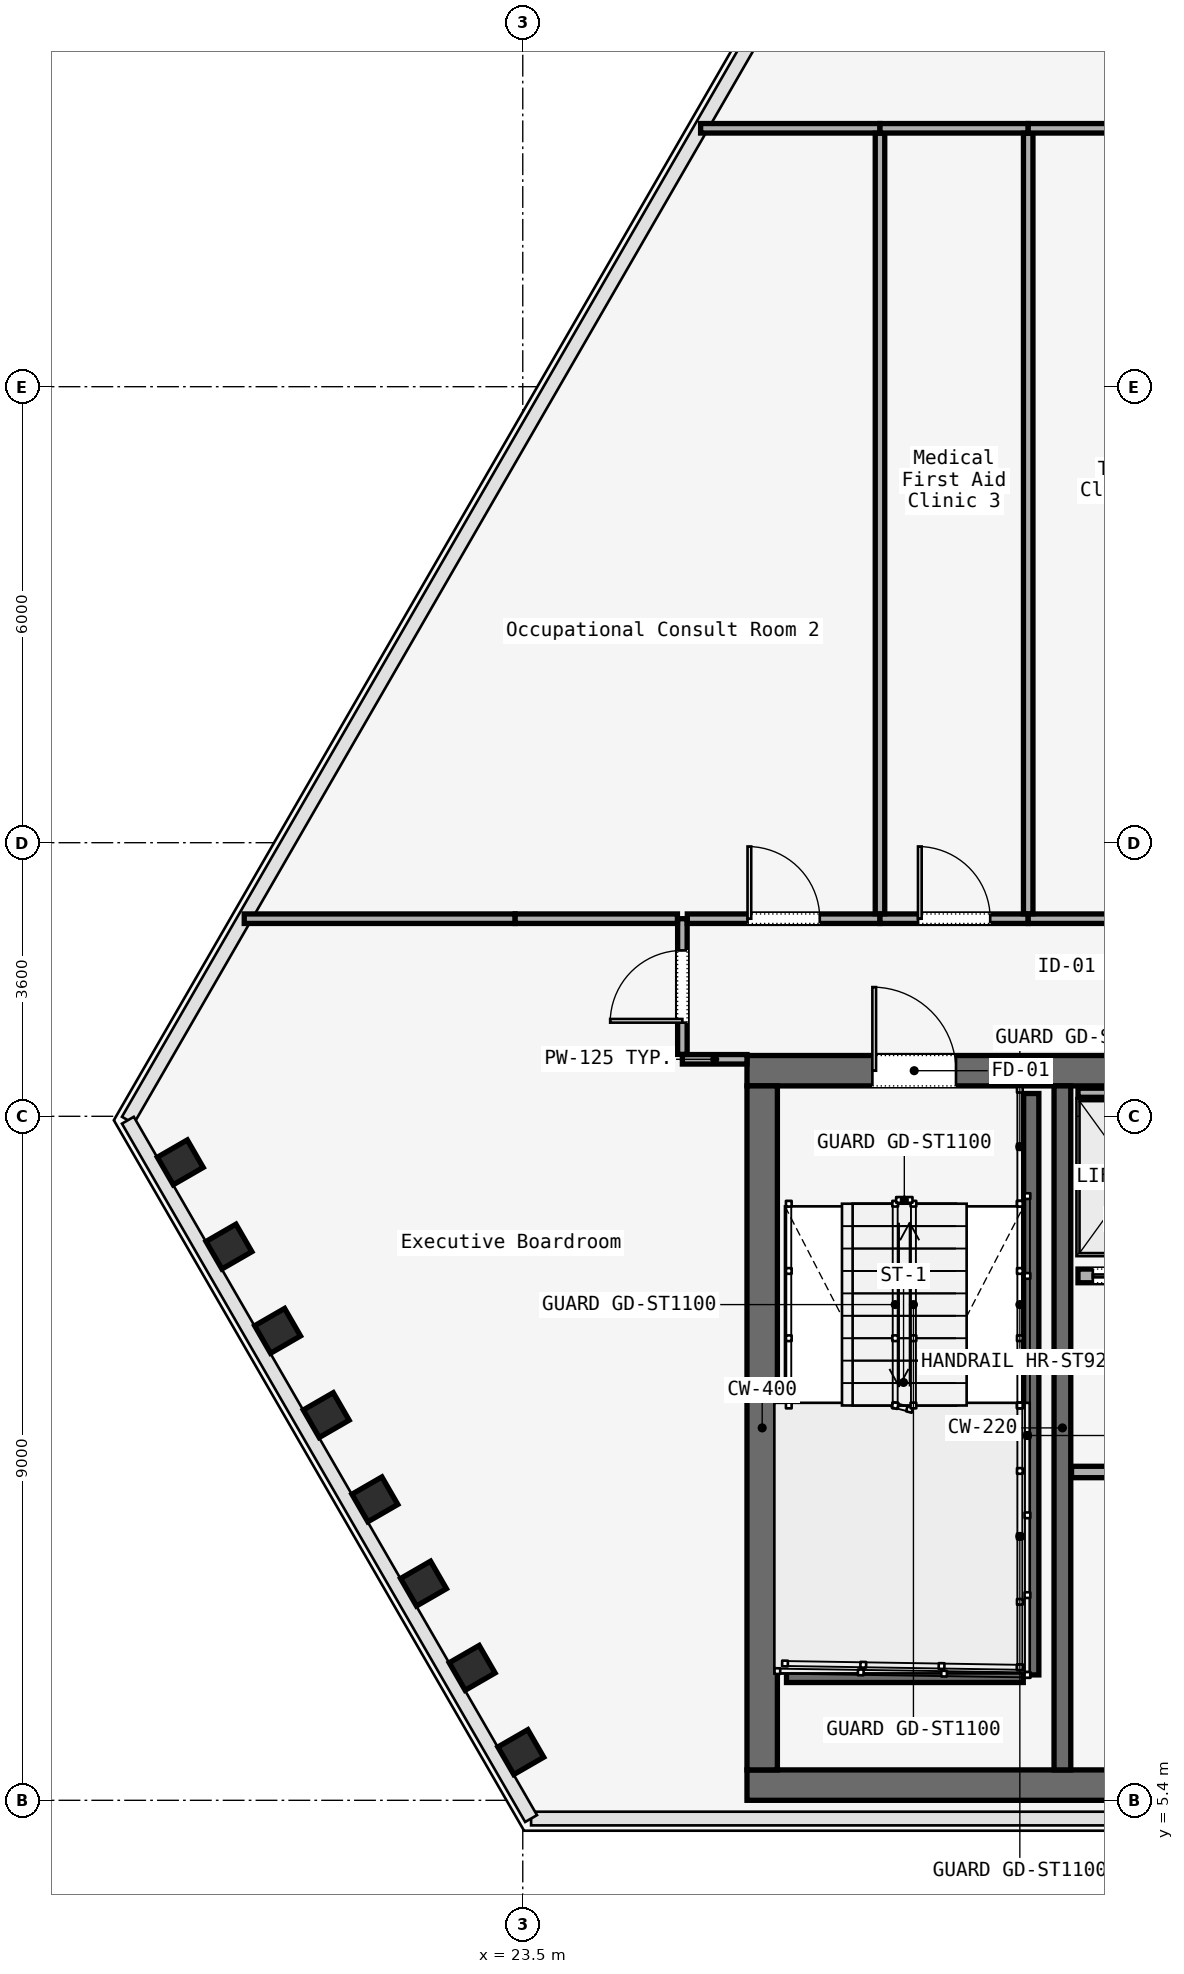
"""IFC4 building model, lengths in metres.
Left out: names, types, materials, properties, quantities, classifications, styles, units other than length and angle.
Written with IfcOpenShell. Run it as: python <this file> out.ifc"""

import sys

from ifc_helpers import new_model, si_unit, direction, frame, frame_2d, origin, origin_2d, place, context, subcontext, project, spatial, rectangle, i_section, extrude, element, fill, save


model = new_model("IFC4")
c1 = context("Model", 3, precision=1e-05, world=origin(), true_north=direction((0.0, 1.0)))
c2 = subcontext(c1, "Body", "Model", "MODEL_VIEW")
j1 = project(units=[si_unit("LENGTHUNIT", "METRE"), si_unit("PLANEANGLEUNIT", "RADIAN")], contexts=[c1])
p1 = place(None, origin())
s1 = spatial("IfcSite", under=j1, at=p1, CompositionType="ELEMENT")
p2 = place(p1, origin())
s2 = spatial("IfcBuilding", under=s1, at=p2, CompositionType="ELEMENT")
p3 = place(p2, frame((0.0, 0.0, 165.0)))
s3 = spatial("IfcBuildingStorey", under=s2, at=p3, CompositionType="ELEMENT", Elevation=165.0)
p4 = place(p3, frame((26.45, 15.0, 0.0), z_axis=(0.0, 0.0, 1.0), x_axis=(1.0, 0.0, 0.0)))
e1 = element("IfcWall", 1, at=p4, inside=s3, PredefinedType="SOLIDWALL", context=c2, shape_type="SweptSolid", body=[
    extrude(rectangle(XDim=31.1, YDim=0.4, at=frame_2d((15.55, 0.0))), origin(), (0.0, 0.0, 1.0), 3.58),
])
p5 = place(p4, frame((1.65, 0.0, 0.0)))
e2 = element("IfcOpeningElement", 2, at=p5, cuts=e1, PredefinedType="OPENING", context=c2, shape_type="SweptSolid", body=[
    extrude(rectangle(XDim=1.1, YDim=2.2, at=frame_2d((0.55, 1.1))), frame((0.0, 0.2, 0.0), z_axis=(0.0, -1.0, 0.0), x_axis=(1.0, 0.0, 0.0)), (0.0, 0.0, 1.0), 0.4),
])
p6 = place(p4, frame((13.65, 0.0, 0.0)))
e3 = element("IfcOpeningElement", 3, at=p6, cuts=e1, PredefinedType="OPENING", context=c2, shape_type="SweptSolid", body=[
    extrude(rectangle(XDim=1.1, YDim=2.2, at=frame_2d((0.55, 1.1))), frame((0.0, 0.2, 0.0), z_axis=(0.0, -1.0, 0.0), x_axis=(1.0, 0.0, 0.0)), (0.0, 0.0, 1.0), 0.4),
])
p7 = place(p4, frame((25.55, 0.0, 0.0)))
e4 = element("IfcOpeningElement", 4, at=p7, cuts=e1, PredefinedType="OPENING", context=c2, shape_type="SweptSolid", body=[
    extrude(rectangle(XDim=1.1, YDim=2.2, at=frame_2d((0.55, 1.1))), frame((0.0, 0.2, 0.0), z_axis=(0.0, -1.0, 0.0), x_axis=(1.0, 0.0, 0.0)), (0.0, 0.0, 1.0), 0.4),
])
p8 = place(p4, frame((10.7, 0.0, 0.0)))
e5 = element("IfcOpeningElement", 5, at=p8, cuts=e1, PredefinedType="OPENING", context=c2, shape_type="SweptSolid", body=[
    extrude(rectangle(XDim=1.4, YDim=2.2, at=frame_2d((0.7, 1.1))), frame((0.0, 0.2, 0.0), z_axis=(0.0, -1.0, 0.0), x_axis=(1.0, 0.0, 0.0)), (0.0, 0.0, 1.0), 0.4),
])
p9 = place(p4, frame((19.35, 0.0, 0.0)))
e6 = element("IfcOpeningElement", 6, at=p9, cuts=e1, PredefinedType="OPENING", context=c2, shape_type="SweptSolid", body=[
    extrude(rectangle(XDim=1.1, YDim=2.2, at=frame_2d((0.55, 1.1))), frame((0.0, 0.2, 0.0), z_axis=(0.0, -1.0, 0.0), x_axis=(1.0, 0.0, 0.0)), (0.0, 0.0, 1.0), 0.4),
])
p10 = place(p4, frame((21.4, 0.0, 0.0)))
e7 = element("IfcOpeningElement", 7, at=p10, cuts=e1, PredefinedType="OPENING", context=c2, shape_type="SweptSolid", body=[
    extrude(rectangle(XDim=0.9, YDim=2.1, at=frame_2d((0.45, 1.05))), frame((0.0, 0.2, 0.0), z_axis=(0.0, -1.0, 0.0), x_axis=(1.0, 0.0, 0.0)), (0.0, 0.0, 1.0), 0.4),
])
p11 = place(p4, frame((23.35, 0.0, 0.0)))
e8 = element("IfcOpeningElement", 8, at=p11, cuts=e1, PredefinedType="OPENING", context=c2, shape_type="SweptSolid", body=[
    extrude(rectangle(XDim=1.3, YDim=2.3, at=frame_2d((0.65, 1.15))), frame((0.0, 0.2, 0.0), z_axis=(0.0, -1.0, 0.0), x_axis=(1.0, 0.0, 0.0)), (0.0, 0.0, 1.0), 0.4),
])
p12 = place(p3, frame((26.45, 5.6, 0.0), z_axis=(0.0, 0.0, 1.0), x_axis=(1.0, 0.0, 0.0)))
e9 = element("IfcWall", 9, at=p12, inside=s3, PredefinedType="SOLIDWALL", context=c2, shape_type="SweptSolid", body=[
    extrude(rectangle(XDim=31.1, YDim=0.4, at=frame_2d((15.55, 0.0))), origin(), (0.0, 0.0, 1.0), 3.58),
])
p13 = place(p3, frame((26.65, 5.8, 0.0), z_axis=(0.0, 0.0, 1.0), x_axis=(0.0, 1.0, 0.0)))
e10 = element("IfcWall", 10, at=p13, inside=s3, PredefinedType="SOLIDWALL", context=c2, shape_type="SweptSolid", body=[
    extrude(rectangle(XDim=9.0, YDim=0.4, at=frame_2d((4.5, 0.0))), origin(), (0.0, 0.0, 1.0), 3.58),
])
p14 = place(p3, frame((30.6, 5.8, 0.0), z_axis=(0.0, 0.0, 1.0), x_axis=(0.0, 1.0, 0.0)))
e11 = element("IfcWall", 11, at=p14, inside=s3, PredefinedType="SOLIDWALL", context=c2, shape_type="SweptSolid", body=[
    extrude(rectangle(XDim=9.0, YDim=0.22, at=frame_2d((4.5, 0.0))), origin(), (0.0, 0.0, 1.0), 3.58),
])
for number, where, z_axis, x_axis in (
    (12, (18.994, 13.794, 0.0), (0.0, 0.0, 1.0), (-0.5, 0.866, 0.0)),
    (13, (19.634, 12.686, 0.0), (0.0, 0.0, 1.0), (-0.5, 0.866, 0.0)),
    (14, (20.274, 11.577, 0.0), (0.0, 0.0, 1.0), (-0.5, 0.866, 0.0)),
    (15, (20.914, 10.469, 0.0), (0.0, 0.0, 1.0), (-0.5, 0.866, 0.0)),
    (16, (21.554, 9.36, 0.0), (0.0, 0.0, 1.0), (-0.5, 0.866, 0.0)),
    (17, (22.194, 8.251, 0.0), (0.0, 0.0, 1.0), (-0.5, 0.866, 0.0)),
    (18, (22.834, 7.143, 0.0), (0.0, 0.0, 1.0), (-0.5, 0.866, 0.0)),
    (19, (23.474, 6.034, 0.0), (0.0, 0.0, 1.0), (-0.5, 0.866, 0.0)),
):
    element("IfcColumn", number, at=place(p3, frame(where, z_axis=z_axis, x_axis=x_axis)), inside=s3, PredefinedType="COLUMN", context=c2, shape_type="SweptSolid", body=[
        extrude(i_section(OverallWidth=0.418, OverallDepth=0.455, WebThickness=0.042, FlangeThickness=0.052, FilletRadius=0.015, at=origin_2d()), origin(), (0.0, 0.0, 1.0), 3.58),
    ])
p15 = place(p3, frame((30.19, 14.7, 0.0), z_axis=(0.0, 0.0, 1.0), x_axis=(0.0, -1.0, 0.0)))
e20 = element("IfcWall", 20, at=p15, inside=s3, PredefinedType="SOLIDWALL", context=c2, shape_type="SweptSolid", body=[
    extrude(rectangle(XDim=7.65, YDim=0.2, at=frame_2d((3.825, 0.0))), origin(), (0.0, 0.0, 1.0), 3.8),
])
p16 = place(p3, frame((26.97, 7.05, 0.0), z_axis=(0.0, 0.0, 1.0), x_axis=(1.0, 0.0, 0.0)))
e21 = element("IfcWall", 21, at=p16, inside=s3, PredefinedType="SOLIDWALL", context=c2, shape_type="SweptSolid", body=[
    extrude(rectangle(XDim=3.115, YDim=0.2, at=frame_2d((1.558, 0.0))), origin(), (0.0, 0.0, 1.0), 3.8),
])
p17 = place(p3, frame((30.72, 9.72, 0.0), z_axis=(0.0, 0.0, 1.0), x_axis=(1.0, 0.0, 0.0)))
e22 = element("IfcWall", 22, at=p17, inside=s3, PredefinedType="PARTITIONING", context=c2, shape_type="SweptSolid", body=[
    extrude(rectangle(XDim=7.96, YDim=0.15, at=frame_2d((3.98, 0.0))), origin(), (0.0, 0.0, 1.0), 3.01),
])
p18 = place(p17, frame((1.5, 0.0, 0.0)))
e23 = element("IfcOpeningElement", 23, at=p18, cuts=e22, PredefinedType="OPENING", context=c2, shape_type="SweptSolid", body=[
    extrude(rectangle(XDim=0.95, YDim=2.2, at=frame_2d((0.475, 1.1))), frame((0.0, 0.075, 0.0), z_axis=(0.0, -1.0, 0.0), x_axis=(1.0, 0.0, 0.0)), (0.0, 0.0, 1.0), 0.15),
])
p19 = place(p17, frame((6.21, 0.0, 0.0)))
e24 = element("IfcOpeningElement", 24, at=p19, cuts=e22, PredefinedType="OPENING", context=c2, shape_type="SweptSolid", body=[
    extrude(rectangle(XDim=0.95, YDim=2.2, at=frame_2d((0.475, 1.1))), frame((0.0, 0.075, 0.0), z_axis=(0.0, -1.0, 0.0), x_axis=(1.0, 0.0, 0.0)), (0.0, 0.0, 1.0), 0.15),
])
p20 = place(p3, frame((30.805, 12.3, 0.0), z_axis=(0.0, 0.0, 1.0), x_axis=(1.0, 0.0, 0.0)))
e25 = element("IfcWall", 25, at=p20, inside=s3, PredefinedType="SOLIDWALL", context=c2, shape_type="SweptSolid", body=[
    extrude(rectangle(XDim=1.49, YDim=0.18, at=frame_2d((0.745, 0.0))), origin(), (0.0, 0.0, 1.0), 3.01),
])
p21 = place(p20, frame((0.195, 0.0, 0.0)))
e26 = element("IfcOpeningElement", 26, at=p21, cuts=e25, PredefinedType="OPENING", context=c2, shape_type="SweptSolid", body=[
    extrude(rectangle(XDim=1.1, YDim=2.2, at=frame_2d((0.55, 1.1))), frame((0.0, 0.09, 0.0), z_axis=(0.0, -1.0, 0.0), x_axis=(1.0, 0.0, 0.0)), (0.0, 0.0, 1.0), 0.18),
])
p22 = place(p3, frame((30.805, 14.71, 0.0), z_axis=(0.0, 0.0, 1.0), x_axis=(1.0, 0.0, 0.0)))
e27 = element("IfcWall", 27, at=p22, inside=s3, PredefinedType="SOLIDWALL", context=c2, shape_type="SweptSolid", body=[
    extrude(rectangle(XDim=1.49, YDim=0.12, at=frame_2d((0.745, 0.0))), origin(), (0.0, 0.0, 1.0), 3.01),
])
p23 = place(p3, frame((26.45, 15.15, 0.0), z_axis=(0.0, 0.0, 1.0), x_axis=(-1.0, 0.0, 0.0)))
e28 = element("IfcWall", 28, at=p23, inside=s3, PredefinedType="PARTITIONING", context=c2, shape_type="SweptSolid", body=[
    extrude(rectangle(XDim=0.85, YDim=0.125, at=frame_2d((0.425, 0.0))), origin(), (0.0, 0.0, 1.0), 3.01),
])
p24 = place(p3, frame((25.6, 15.215, 0.0), z_axis=(0.0, 0.0, 1.0), x_axis=(0.0, 1.0, 0.0)))
e29 = element("IfcWall", 29, at=p24, inside=s3, PredefinedType="PARTITIONING", context=c2, shape_type="SweptSolid", body=[
    extrude(rectangle(XDim=1.785, YDim=0.125, at=frame_2d((0.893, 0.0))), origin(), (0.0, 0.0, 1.0), 3.01),
])
p25 = place(p24, frame((0.417, 0.0, 0.0)))
e30 = element("IfcOpeningElement", 30, at=p25, cuts=e29, PredefinedType="OPENING", context=c2, shape_type="SweptSolid", body=[
    extrude(rectangle(XDim=0.95, YDim=2.2, at=frame_2d((0.475, 1.1))), frame((0.0, 0.062, 0.0), z_axis=(0.0, -1.0, 0.0), x_axis=(1.0, 0.0, 0.0)), (0.0, 0.0, 1.0), 0.125),
])
p26 = place(p3, frame((25.665, 17.0, 0.0), z_axis=(0.0, 0.0, 1.0), x_axis=(1.0, 0.0, 0.0)))
e31 = element("IfcWall", 31, at=p26, inside=s3, PredefinedType="PARTITIONING", context=c2, shape_type="SweptSolid", body=[
    extrude(rectangle(XDim=2.535, YDim=0.125, at=frame_2d((1.268, 0.0))), origin(), (0.0, 0.0, 1.0), 3.01),
])
p27 = place(p26, frame((0.792, 0.0, 0.0)))
e32 = element("IfcOpeningElement", 32, at=p27, cuts=e31, PredefinedType="OPENING", context=c2, shape_type="SweptSolid", body=[
    extrude(rectangle(XDim=0.95, YDim=2.2, at=frame_2d((0.475, 1.1))), frame((0.0, 0.062, 0.0), z_axis=(0.0, -1.0, 0.0), x_axis=(1.0, 0.0, 0.0)), (0.0, 0.0, 1.0), 0.125),
])
p28 = place(p3, frame((28.2, 17.0, 0.0), z_axis=(0.0, 0.0, 1.0), x_axis=(1.0, 0.0, 0.0)))
e33 = element("IfcWall", 33, at=p28, inside=s3, PredefinedType="PARTITIONING", context=c2, shape_type="SweptSolid", body=[
    extrude(rectangle(XDim=1.95, YDim=0.125, at=frame_2d((0.975, 0.0))), origin(), (0.0, 0.0, 1.0), 3.01),
])
p29 = place(p28, frame((0.5, 0.0, 0.0)))
e34 = element("IfcOpeningElement", 34, at=p29, cuts=e33, PredefinedType="OPENING", context=c2, shape_type="SweptSolid", body=[
    extrude(rectangle(XDim=0.95, YDim=2.2, at=frame_2d((0.475, 1.1))), frame((0.0, 0.062, 0.0), z_axis=(0.0, -1.0, 0.0), x_axis=(1.0, 0.0, 0.0)), (0.0, 0.0, 1.0), 0.125),
])
p30 = place(p3, frame((30.15, 17.0, 0.0), z_axis=(0.0, 0.0, 1.0), x_axis=(1.0, 0.0, 0.0)))
e35 = element("IfcWall", 35, at=p30, inside=s3, PredefinedType="PARTITIONING", context=c2, shape_type="SweptSolid", body=[
    extrude(rectangle(XDim=3.05, YDim=0.125, at=frame_2d((1.525, 0.0))), origin(), (0.0, 0.0, 1.0), 3.01),
])
p31 = place(p30, frame((1.05, 0.0, 0.0)))
e36 = element("IfcOpeningElement", 36, at=p31, cuts=e35, PredefinedType="OPENING", context=c2, shape_type="SweptSolid", body=[
    extrude(rectangle(XDim=0.95, YDim=2.2, at=frame_2d((0.475, 1.1))), frame((0.0, 0.062, 0.0), z_axis=(0.0, -1.0, 0.0), x_axis=(1.0, 0.0, 0.0)), (0.0, 0.0, 1.0), 0.125),
])
p32 = place(p3, frame((19.835, 17.0, 0.0), z_axis=(0.0, 0.0, 1.0), x_axis=(1.0, 0.0, 0.0)))
e37 = element("IfcWall", 37, at=p32, inside=s3, PredefinedType="PARTITIONING", context=c2, shape_type="SweptSolid", body=[
    extrude(rectangle(XDim=3.564, YDim=0.125, at=frame_2d((1.782, 0.0))), origin(), (0.0, 0.0, 1.0), 3.01),
])
p33 = place(p3, frame((23.4, 17.0, 0.0), z_axis=(0.0, 0.0, 1.0), x_axis=(1.0, 0.0, 0.0)))
e38 = element("IfcWall", 38, at=p33, inside=s3, PredefinedType="PARTITIONING", context=c2, shape_type="SweptSolid", body=[
    extrude(rectangle(XDim=2.135, YDim=0.125, at=frame_2d((1.067, 0.0))), origin(), (0.0, 0.0, 1.0), 3.01),
])
p34 = place(p3, frame((25.84, 27.4, 0.0), z_axis=(0.0, 0.0, 1.0), x_axis=(1.0, 0.0, 0.0)))
e39 = element("IfcWall", 39, at=p34, inside=s3, PredefinedType="PARTITIONING", context=c2, shape_type="SweptSolid", body=[
    extrude(rectangle(XDim=2.36, YDim=0.125, at=frame_2d((1.18, 0.0))), origin(), (0.0, 0.0, 1.0), 3.01),
])
p35 = place(p3, frame((28.2, 27.335, 0.0), z_axis=(0.0, 0.0, 1.0), x_axis=(0.0, -1.0, 0.0)))
e40 = element("IfcWall", 40, at=p35, inside=s3, PredefinedType="PARTITIONING", context=c2, shape_type="SweptSolid", body=[
    extrude(rectangle(XDim=10.27, YDim=0.125, at=frame_2d((5.135, 0.0))), origin(), (0.0, 0.0, 1.0), 3.01),
])
p36 = place(p3, frame((28.2, 27.4, 0.0), z_axis=(0.0, 0.0, 1.0), x_axis=(1.0, 0.0, 0.0)))
e41 = element("IfcWall", 41, at=p36, inside=s3, PredefinedType="PARTITIONING", context=c2, shape_type="SweptSolid", body=[
    extrude(rectangle(XDim=1.95, YDim=0.125, at=frame_2d((0.975, 0.0))), origin(), (0.0, 0.0, 1.0), 3.01),
])
p37 = place(p3, frame((30.15, 27.335, 0.0), z_axis=(0.0, 0.0, 1.0), x_axis=(0.0, -1.0, 0.0)))
e42 = element("IfcWall", 42, at=p37, inside=s3, PredefinedType="PARTITIONING", context=c2, shape_type="SweptSolid", body=[
    extrude(rectangle(XDim=10.27, YDim=0.125, at=frame_2d((5.135, 0.0))), origin(), (0.0, 0.0, 1.0), 3.01),
])
p38 = place(p3, frame((30.15, 27.4, 0.0), z_axis=(0.0, 0.0, 1.0), x_axis=(1.0, 0.0, 0.0)))
e43 = element("IfcWall", 43, at=p38, inside=s3, PredefinedType="PARTITIONING", context=c2, shape_type="SweptSolid", body=[
    extrude(rectangle(XDim=2.985, YDim=0.125, at=frame_2d((1.493, 0.0))), origin(), (0.0, 0.0, 1.0), 3.01),
])
p39 = place(p5, origin())
e44 = element("IfcDoor", 44, at=p39, inside=s3, OperationType="SINGLE_SWING_RIGHT", PredefinedType="DOOR", context=c2, shape_type="SweptSolid", body=[
    extrude(rectangle(XDim=1.1, YDim=2.2, at=frame_2d((0.55, 1.1))), frame((0.0, 0.025, 0.0), z_axis=(0.0, -1.0, 0.0), x_axis=(1.0, 0.0, 0.0)), (0.0, 0.0, 1.0), 0.05),
])
fill(e2, e44)
p40 = place(p21, origin())
e45 = element("IfcDoor", 45, at=p40, inside=s3, OperationType="SLIDING_TO_LEFT", PredefinedType="DOOR", context=c2, shape_type="SweptSolid", body=[
    extrude(rectangle(XDim=1.1, YDim=2.2, at=frame_2d((0.55, 1.1))), frame((0.0, 0.025, 0.0), z_axis=(0.0, -1.0, 0.0), x_axis=(1.0, 0.0, 0.0)), (0.0, 0.0, 1.0), 0.05),
])
fill(e26, e45)
p41 = place(p25, origin())
e46 = element("IfcDoor", 46, at=p41, inside=s3, OperationType="SINGLE_SWING_RIGHT", PredefinedType="DOOR", context=c2, shape_type="SweptSolid", body=[
    extrude(rectangle(XDim=0.95, YDim=2.2, at=frame_2d((0.475, 1.1))), frame((0.0, 0.025, 0.0), z_axis=(0.0, -1.0, 0.0), x_axis=(1.0, 0.0, 0.0)), (0.0, 0.0, 1.0), 0.05),
])
fill(e30, e46)
p42 = place(p27, origin())
e47 = element("IfcDoor", 47, at=p42, inside=s3, OperationType="SINGLE_SWING_LEFT", PredefinedType="DOOR", context=c2, shape_type="SweptSolid", body=[
    extrude(rectangle(XDim=0.95, YDim=2.2, at=frame_2d((0.475, 1.1))), frame((0.0, 0.025, 0.0), z_axis=(0.0, -1.0, 0.0), x_axis=(1.0, 0.0, 0.0)), (0.0, 0.0, 1.0), 0.05),
])
fill(e32, e47)
p43 = place(p29, origin())
e48 = element("IfcDoor", 48, at=p43, inside=s3, OperationType="SINGLE_SWING_RIGHT", PredefinedType="DOOR", context=c2, shape_type="SweptSolid", body=[
    extrude(rectangle(XDim=0.95, YDim=2.2, at=frame_2d((0.475, 1.1))), frame((0.0, 0.025, 0.0), z_axis=(0.0, -1.0, 0.0), x_axis=(1.0, 0.0, 0.0)), (0.0, 0.0, 1.0), 0.05),
])
fill(e34, e48)
save(model, sys.argv[1])
